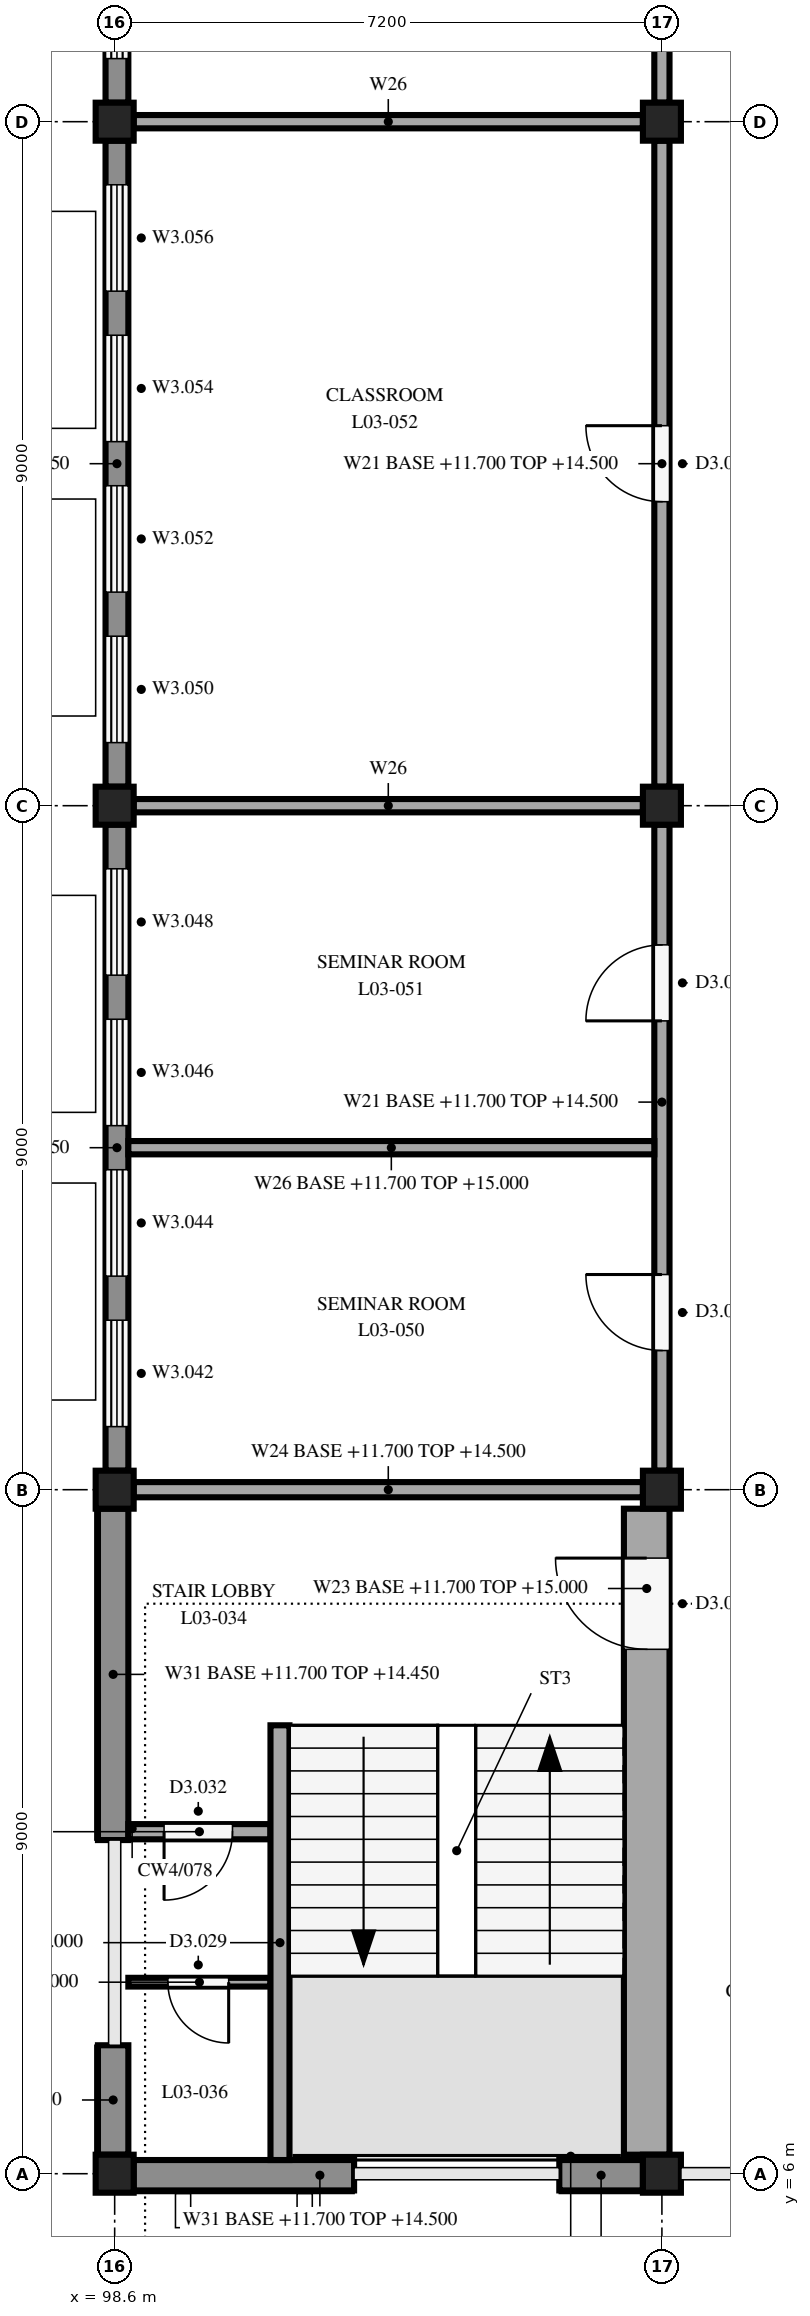
"""IFC4 building model, lengths in metres.
Left out: names, types, materials, properties, quantities, classifications, styles, units other than length and angle.
Written with IfcOpenShell. Run it as: python <this file> out.ifc"""

import sys

from ifc_helpers import new_model, si_unit, direction, frame, frame_2d, origin, origin_2d, place, context, subcontext, project, spatial, rectangle, extrude, element, fill, save


model = new_model("IFC4")
c1 = context("Model", 3, precision=1e-05, world=origin(), true_north=direction((0.0, 1.0)))
c2 = subcontext(c1, "Body", "Model", "MODEL_VIEW")
j1 = project(units=[si_unit("LENGTHUNIT", "METRE"), si_unit("PLANEANGLEUNIT", "RADIAN")], contexts=[c1])
p1 = place(None, origin())
s1 = spatial("IfcSite", under=j1, at=p1, CompositionType="ELEMENT")
p2 = place(p1, origin())
s2 = spatial("IfcBuilding", under=s1, at=p2, CompositionType="ELEMENT")
p3 = place(p2, frame((0.0, 0.0, 11.7)))
s3 = spatial("IfcBuildingStorey", under=s2, at=p3, CompositionType="ELEMENT", Elevation=11.7)
for number, where, z_axis, x_axis in (
    (1, (98.6, 6.0, 0.0), (0.0, 0.0, 1.0), (1.0, 0.0, 0.0)),
    (2, (98.6, 15.0, 0.0), (0.0, 0.0, 1.0), (1.0, 0.0, 0.0)),
    (3, (98.6, 24.0, 0.0), (0.0, 0.0, 1.0), (1.0, 0.0, 0.0)),
    (4, (98.6, 33.0, 0.0), (0.0, 0.0, 1.0), (1.0, 0.0, 0.0)),
    (5, (105.8, 6.0, 0.0), (0.0, 0.0, 1.0), (1.0, 0.0, 0.0)),
    (6, (105.8, 15.0, 0.0), (0.0, 0.0, 1.0), (1.0, 0.0, 0.0)),
    (7, (105.8, 24.0, 0.0), (0.0, 0.0, 1.0), (1.0, 0.0, 0.0)),
    (8, (105.8, 33.0, 0.0), (0.0, 0.0, 1.0), (1.0, 0.0, 0.0)),
):
    element("IfcColumn", number, at=place(p3, frame(where, z_axis=z_axis, x_axis=x_axis)), inside=s3, PredefinedType="COLUMN", context=c2, shape_type="SweptSolid", body=[
        extrude(rectangle(XDim=0.5, YDim=0.5, at=origin_2d()), origin(), (0.0, 0.0, 1.0), 3.3),
    ])
p4 = place(p3, frame((98.58, 6.25, 0.0), z_axis=(0.0, 0.0, 1.0), x_axis=(0.0, 1.0, 0.0)))
e9 = element("IfcWall", 9, at=p4, inside=s3, PredefinedType="STANDARD", context=c2, shape_type="SweptSolid", body=[
    extrude(rectangle(XDim=1.44, YDim=0.4, at=frame_2d((0.72, 0.0))), origin(), (0.0, 0.0, 1.0), 2.75),
])
p5 = place(p3, frame((98.58, 10.39, 0.0), z_axis=(0.0, 0.0, 1.0), x_axis=(0.0, 1.0, 0.0)))
e10 = element("IfcWall", 10, at=p5, inside=s3, PredefinedType="STANDARD", context=c2, shape_type="SweptSolid", body=[
    extrude(rectangle(XDim=4.36, YDim=0.4, at=frame_2d((2.18, 0.0))), origin(), (0.0, 0.0, 1.0), 2.75),
])
p6 = place(p3, frame((98.63, 15.25, 0.0), z_axis=(0.0, 0.0, 1.0), x_axis=(0.0, 1.0, 0.0)))
e11 = element("IfcWall", 11, at=p6, inside=s3, PredefinedType="STANDARD", context=c2, shape_type="SweptSolid", body=[
    extrude(rectangle(XDim=8.5, YDim=0.3, at=frame_2d((4.25, 0.0))), origin(), (0.0, 0.0, 1.0), 2.75),
])
p7 = place(p6, frame((0.58, 0.0, 0.6)))
e12 = element("IfcOpeningElement", 12, at=p7, cuts=e11, PredefinedType="OPENING", context=c2, shape_type="SweptSolid", body=[
    extrude(rectangle(XDim=1.4, YDim=2.1, at=frame_2d((0.7, 1.05))), frame((0.0, 0.16, 0.0), z_axis=(0.0, -1.0, 0.0), x_axis=(1.0, 0.0, 0.0)), (0.0, 0.0, 1.0), 0.32),
])
p8 = place(p6, frame((2.56, 0.0, 0.6)))
e13 = element("IfcOpeningElement", 13, at=p8, cuts=e11, PredefinedType="OPENING", context=c2, shape_type="SweptSolid", body=[
    extrude(rectangle(XDim=1.4, YDim=2.1, at=frame_2d((0.7, 1.05))), frame((0.0, 0.16, 0.0), z_axis=(0.0, -1.0, 0.0), x_axis=(1.0, 0.0, 0.0)), (0.0, 0.0, 1.0), 0.32),
])
p9 = place(p6, frame((4.54, 0.0, 0.6)))
e14 = element("IfcOpeningElement", 14, at=p9, cuts=e11, PredefinedType="OPENING", context=c2, shape_type="SweptSolid", body=[
    extrude(rectangle(XDim=1.4, YDim=2.1, at=frame_2d((0.7, 1.05))), frame((0.0, 0.16, 0.0), z_axis=(0.0, -1.0, 0.0), x_axis=(1.0, 0.0, 0.0)), (0.0, 0.0, 1.0), 0.32),
])
p10 = place(p6, frame((6.52, 0.0, 0.6)))
e15 = element("IfcOpeningElement", 15, at=p10, cuts=e11, PredefinedType="OPENING", context=c2, shape_type="SweptSolid", body=[
    extrude(rectangle(XDim=1.4, YDim=2.1, at=frame_2d((0.7, 1.05))), frame((0.0, 0.16, 0.0), z_axis=(0.0, -1.0, 0.0), x_axis=(1.0, 0.0, 0.0)), (0.0, 0.0, 1.0), 0.32),
])
p11 = place(p3, frame((98.63, 24.25, 0.0), z_axis=(0.0, 0.0, 1.0), x_axis=(0.0, 1.0, 0.0)))
e16 = element("IfcWall", 16, at=p11, inside=s3, PredefinedType="STANDARD", context=c2, shape_type="SweptSolid", body=[
    extrude(rectangle(XDim=8.5, YDim=0.3, at=frame_2d((4.25, 0.0))), origin(), (0.0, 0.0, 1.0), 2.75),
])
p12 = place(p11, frame((0.58, 0.0, 0.6)))
e17 = element("IfcOpeningElement", 17, at=p12, cuts=e16, PredefinedType="OPENING", context=c2, shape_type="SweptSolid", body=[
    extrude(rectangle(XDim=1.4, YDim=2.1, at=frame_2d((0.7, 1.05))), frame((0.0, 0.16, 0.0), z_axis=(0.0, -1.0, 0.0), x_axis=(1.0, 0.0, 0.0)), (0.0, 0.0, 1.0), 0.32),
])
p13 = place(p11, frame((2.56, 0.0, 0.6)))
e18 = element("IfcOpeningElement", 18, at=p13, cuts=e16, PredefinedType="OPENING", context=c2, shape_type="SweptSolid", body=[
    extrude(rectangle(XDim=1.4, YDim=2.1, at=frame_2d((0.7, 1.05))), frame((0.0, 0.16, 0.0), z_axis=(0.0, -1.0, 0.0), x_axis=(1.0, 0.0, 0.0)), (0.0, 0.0, 1.0), 0.32),
])
p14 = place(p11, frame((4.54, 0.0, 0.6)))
e19 = element("IfcOpeningElement", 19, at=p14, cuts=e16, PredefinedType="OPENING", context=c2, shape_type="SweptSolid", body=[
    extrude(rectangle(XDim=1.4, YDim=2.1, at=frame_2d((0.7, 1.05))), frame((0.0, 0.16, 0.0), z_axis=(0.0, -1.0, 0.0), x_axis=(1.0, 0.0, 0.0)), (0.0, 0.0, 1.0), 0.32),
])
p15 = place(p11, frame((6.52, 0.0, 0.6)))
e20 = element("IfcOpeningElement", 20, at=p15, cuts=e16, PredefinedType="OPENING", context=c2, shape_type="SweptSolid", body=[
    extrude(rectangle(XDim=1.4, YDim=2.1, at=frame_2d((0.7, 1.05))), frame((0.0, 0.16, 0.0), z_axis=(0.0, -1.0, 0.0), x_axis=(1.0, 0.0, 0.0)), (0.0, 0.0, 1.0), 0.32),
])
p16 = place(p3, frame((98.63, 33.25, 0.0), z_axis=(0.0, 0.0, 1.0), x_axis=(0.0, 1.0, 0.0)))
e21 = element("IfcWall", 21, at=p16, inside=s3, PredefinedType="STANDARD", context=c2, shape_type="SweptSolid", body=[
    extrude(rectangle(XDim=8.5, YDim=0.3, at=frame_2d((4.25, 0.0))), origin(), (0.0, 0.0, 1.0), 2.75),
])
p17 = place(p16, frame((0.58, 0.0, 0.6)))
e22 = element("IfcOpeningElement", 22, at=p17, cuts=e21, PredefinedType="OPENING", context=c2, shape_type="SweptSolid", body=[
    extrude(rectangle(XDim=1.4, YDim=2.1, at=frame_2d((0.7, 1.05))), frame((0.0, 0.16, 0.0), z_axis=(0.0, -1.0, 0.0), x_axis=(1.0, 0.0, 0.0)), (0.0, 0.0, 1.0), 0.32),
])
p18 = place(p16, frame((2.56, 0.0, 0.6)))
e23 = element("IfcOpeningElement", 23, at=p18, cuts=e21, PredefinedType="OPENING", context=c2, shape_type="SweptSolid", body=[
    extrude(rectangle(XDim=1.4, YDim=2.1, at=frame_2d((0.7, 1.05))), frame((0.0, 0.16, 0.0), z_axis=(0.0, -1.0, 0.0), x_axis=(1.0, 0.0, 0.0)), (0.0, 0.0, 1.0), 0.32),
])
p19 = place(p16, frame((4.54, 0.0, 0.6)))
e24 = element("IfcOpeningElement", 24, at=p19, cuts=e21, PredefinedType="OPENING", context=c2, shape_type="SweptSolid", body=[
    extrude(rectangle(XDim=1.4, YDim=2.1, at=frame_2d((0.7, 1.05))), frame((0.0, 0.16, 0.0), z_axis=(0.0, -1.0, 0.0), x_axis=(1.0, 0.0, 0.0)), (0.0, 0.0, 1.0), 0.32),
])
p20 = place(p16, frame((6.52, 0.0, 0.6)))
e25 = element("IfcOpeningElement", 25, at=p20, cuts=e21, PredefinedType="OPENING", context=c2, shape_type="SweptSolid", body=[
    extrude(rectangle(XDim=1.4, YDim=2.1, at=frame_2d((0.7, 1.05))), frame((0.0, 0.16, 0.0), z_axis=(0.0, -1.0, 0.0), x_axis=(1.0, 0.0, 0.0)), (0.0, 0.0, 1.0), 0.32),
])
p21 = place(p3, frame((101.75, 5.98, 0.0), z_axis=(0.0, 0.0, 1.0), x_axis=(-1.0, 0.0, 0.0)))
e26 = element("IfcWall", 26, at=p21, inside=s3, PredefinedType="STANDARD", context=c2, shape_type="SweptSolid", body=[
    extrude(rectangle(XDim=2.9, YDim=0.4, at=frame_2d((1.45, 0.0))), origin(), (0.0, 0.0, 1.0), 2.8),
])
p22 = place(p3, frame((105.55, 5.98, 0.0), z_axis=(0.0, 0.0, 1.0), x_axis=(-1.0, 0.0, 0.0)))
e27 = element("IfcWall", 27, at=p22, inside=s3, PredefinedType="STANDARD", context=c2, shape_type="SweptSolid", body=[
    extrude(rectangle(XDim=1.1, YDim=0.4, at=frame_2d((0.55, 0.0))), origin(), (0.0, 0.0, 1.0), 2.8),
])
p23 = place(p3, frame((100.775, 6.18, 0.0), z_axis=(0.0, 0.0, 1.0), x_axis=(0.0, 1.0, 0.0)))
e28 = element("IfcWall", 28, at=p23, inside=s3, PredefinedType="SOLIDWALL", context=c2, shape_type="SweptSolid", body=[
    extrude(rectangle(XDim=5.72, YDim=0.25, at=frame_2d((2.86, 0.0))), origin(), (0.0, 0.0, 1.0), 3.3),
])
p24 = place(p3, frame((105.6, 6.25, 0.0), z_axis=(0.0, 0.0, 1.0), x_axis=(0.0, 1.0, 0.0)))
e29 = element("IfcWall", 29, at=p24, inside=s3, PredefinedType="SOLIDWALL", context=c2, shape_type="SweptSolid", body=[
    extrude(rectangle(XDim=8.5, YDim=0.6, at=frame_2d((4.25, 0.0))), origin(), (0.0, 0.0, 1.0), 3.3),
])
p25 = place(p24, frame((6.65, 0.0, 0.0)))
e30 = element("IfcOpeningElement", 30, at=p25, cuts=e29, PredefinedType="OPENING", context=c2, shape_type="SweptSolid", body=[
    extrude(rectangle(XDim=1.2, YDim=2.1, at=frame_2d((0.6, 1.05))), frame((0.0, 0.31, 0.0), z_axis=(0.0, -1.0, 0.0), x_axis=(1.0, 0.0, 0.0)), (0.0, 0.0, 1.0), 0.62),
])
p26 = place(p3, frame((100.65, 10.5, 0.0), z_axis=(0.0, 0.0, 1.0), x_axis=(-1.0, 0.0, 0.0)))
e31 = element("IfcWall", 31, at=p26, inside=s3, PredefinedType="SOLIDWALL", context=c2, shape_type="SweptSolid", body=[
    extrude(rectangle(XDim=1.87, YDim=0.2, at=frame_2d((0.935, 0.0))), origin(), (0.0, 0.0, 1.0), 3.3),
])
p27 = place(p26, frame((0.5, 0.0, 0.0)))
e32 = element("IfcOpeningElement", 32, at=p27, cuts=e31, PredefinedType="OPENING", context=c2, shape_type="SweptSolid", body=[
    extrude(rectangle(XDim=0.9, YDim=2.1, at=frame_2d((0.45, 1.05))), frame((0.0, 0.11, 0.0), z_axis=(0.0, -1.0, 0.0), x_axis=(1.0, 0.0, 0.0)), (0.0, 0.0, 1.0), 0.22),
])
p28 = place(p3, frame((100.65, 8.52, 0.0), z_axis=(0.0, 0.0, 1.0), x_axis=(-1.0, 0.0, 0.0)))
e33 = element("IfcWall", 33, at=p28, inside=s3, PredefinedType="PARTITIONING", context=c2, shape_type="SweptSolid", body=[
    extrude(rectangle(XDim=1.87, YDim=0.115, at=frame_2d((0.935, 0.0))), origin(), (0.0, 0.0, 1.0), 3.3),
])
p29 = place(p28, frame((0.55, 0.0, 0.0)))
e34 = element("IfcOpeningElement", 34, at=p29, cuts=e33, PredefinedType="OPENING", context=c2, shape_type="SweptSolid", body=[
    extrude(rectangle(XDim=0.8, YDim=2.1, at=frame_2d((0.4, 1.05))), frame((0.0, 0.067, 0.0), z_axis=(0.0, -1.0, 0.0), x_axis=(1.0, 0.0, 0.0)), (0.0, 0.0, 1.0), 0.135),
])
p30 = place(p3, frame((98.85, 15.0, 0.0), z_axis=(0.0, 0.0, 1.0), x_axis=(1.0, 0.0, 0.0)))
e35 = element("IfcWall", 35, at=p30, inside=s3, PredefinedType="SOLIDWALL", context=c2, shape_type="SweptSolid", body=[
    extrude(rectangle(XDim=6.7, YDim=0.2, at=frame_2d((3.35, 0.0))), origin(), (0.0, 0.0, 1.0), 2.8),
])
p31 = place(p3, frame((105.8, 15.25, 0.0), z_axis=(0.0, 0.0, 1.0), x_axis=(0.0, 1.0, 0.0)))
e36 = element("IfcWall", 36, at=p31, inside=s3, PredefinedType="PARTITIONING", context=c2, shape_type="SweptSolid", body=[
    extrude(rectangle(XDim=8.5, YDim=0.2, at=frame_2d((4.25, 0.0))), origin(), (0.0, 0.0, 1.0), 2.8),
])
p32 = place(p31, frame((1.581, 0.0, 0.0)))
e37 = element("IfcOpeningElement", 37, at=p32, cuts=e36, PredefinedType="OPENING", context=c2, shape_type="SweptSolid", body=[
    extrude(rectangle(XDim=1.0, YDim=2.1, at=frame_2d((0.5, 1.05))), frame((0.0, 0.11, 0.0), z_axis=(0.0, -1.0, 0.0), x_axis=(1.0, 0.0, 0.0)), (0.0, 0.0, 1.0), 0.22),
])
p33 = place(p31, frame((5.919, 0.0, 0.0)))
e38 = element("IfcOpeningElement", 38, at=p33, cuts=e36, PredefinedType="OPENING", context=c2, shape_type="SweptSolid", body=[
    extrude(rectangle(XDim=1.0, YDim=2.1, at=frame_2d((0.5, 1.05))), frame((0.0, 0.11, 0.0), z_axis=(0.0, -1.0, 0.0), x_axis=(1.0, 0.0, 0.0)), (0.0, 0.0, 1.0), 0.22),
])
p34 = place(p3, frame((105.8, 24.25, 0.0), z_axis=(0.0, 0.0, 1.0), x_axis=(0.0, 1.0, 0.0)))
e39 = element("IfcWall", 39, at=p34, inside=s3, PredefinedType="PARTITIONING", context=c2, shape_type="SweptSolid", body=[
    extrude(rectangle(XDim=8.5, YDim=0.2, at=frame_2d((4.25, 0.0))), origin(), (0.0, 0.0, 1.0), 2.8),
])
p35 = place(p34, frame((3.75, 0.0, 0.0)))
e40 = element("IfcOpeningElement", 40, at=p35, cuts=e39, PredefinedType="OPENING", context=c2, shape_type="SweptSolid", body=[
    extrude(rectangle(XDim=1.0, YDim=2.1, at=frame_2d((0.5, 1.05))), frame((0.0, 0.11, 0.0), z_axis=(0.0, -1.0, 0.0), x_axis=(1.0, 0.0, 0.0)), (0.0, 0.0, 1.0), 0.22),
])
p36 = place(p3, frame((105.8, 33.25, 0.0), z_axis=(0.0, 0.0, 1.0), x_axis=(0.0, 1.0, 0.0)))
e41 = element("IfcWall", 41, at=p36, inside=s3, PredefinedType="PARTITIONING", context=c2, shape_type="SweptSolid", body=[
    extrude(rectangle(XDim=8.5, YDim=0.2, at=frame_2d((4.25, 0.0))), origin(), (0.0, 0.0, 1.0), 2.8),
])
p37 = place(p36, frame((3.75, 0.0, 0.0)))
e42 = element("IfcOpeningElement", 42, at=p37, cuts=e41, PredefinedType="OPENING", context=c2, shape_type="SweptSolid", body=[
    extrude(rectangle(XDim=1.0, YDim=2.1, at=frame_2d((0.5, 1.05))), frame((0.0, 0.11, 0.0), z_axis=(0.0, -1.0, 0.0), x_axis=(1.0, 0.0, 0.0)), (0.0, 0.0, 1.0), 0.22),
])
p38 = place(p3, frame((98.78, 19.5, 0.0), z_axis=(0.0, 0.0, 1.0), x_axis=(1.0, 0.0, 0.0)))
e43 = element("IfcWall", 43, at=p38, inside=s3, PredefinedType="PARTITIONING", context=c2, shape_type="SweptSolid", body=[
    extrude(rectangle(XDim=6.92, YDim=0.175, at=frame_2d((3.46, 0.0))), origin(), (0.0, 0.0, 1.0), 3.3),
])
for number, where, z_axis, x_axis in (
    (44, (98.85, 24.0, 0.0), (0.0, 0.0, 1.0), (1.0, 0.0, 0.0)),
    (45, (98.85, 33.0, 0.0), (0.0, 0.0, 1.0), (1.0, 0.0, 0.0)),
):
    element("IfcWall", number, at=place(p3, frame(where, z_axis=z_axis, x_axis=x_axis)), inside=s3, PredefinedType="PARTITIONING", context=c2, shape_type="SweptSolid", body=[
        extrude(rectangle(XDim=6.7, YDim=0.175, at=frame_2d((3.35, 0.0))), origin(), (0.0, 0.0, 1.0), 2.8),
    ])
p39 = place(p7, origin())
e46 = element("IfcWindow", 46, at=p39, inside=s3, PartitioningType="DOUBLE_PANEL_VERTICAL", PredefinedType="WINDOW", context=c2, shape_type="SweptSolid", body=[
    extrude(rectangle(XDim=1.4, YDim=2.1, at=frame_2d((0.7, 1.05))), frame((0.0, 0.03, 0.0), z_axis=(0.0, -1.0, 0.0), x_axis=(1.0, 0.0, 0.0)), (0.0, 0.0, 1.0), 0.06),
])
fill(e12, e46)
p40 = place(p8, origin())
e47 = element("IfcWindow", 47, at=p40, inside=s3, PartitioningType="DOUBLE_PANEL_VERTICAL", PredefinedType="WINDOW", context=c2, shape_type="SweptSolid", body=[
    extrude(rectangle(XDim=1.4, YDim=2.1, at=frame_2d((0.7, 1.05))), frame((0.0, 0.03, 0.0), z_axis=(0.0, -1.0, 0.0), x_axis=(1.0, 0.0, 0.0)), (0.0, 0.0, 1.0), 0.06),
])
fill(e13, e47)
p41 = place(p9, origin())
e48 = element("IfcWindow", 48, at=p41, inside=s3, PartitioningType="DOUBLE_PANEL_VERTICAL", PredefinedType="WINDOW", context=c2, shape_type="SweptSolid", body=[
    extrude(rectangle(XDim=1.4, YDim=2.1, at=frame_2d((0.7, 1.05))), frame((0.0, 0.03, 0.0), z_axis=(0.0, -1.0, 0.0), x_axis=(1.0, 0.0, 0.0)), (0.0, 0.0, 1.0), 0.06),
])
fill(e14, e48)
p42 = place(p10, origin())
e49 = element("IfcWindow", 49, at=p42, inside=s3, PartitioningType="DOUBLE_PANEL_VERTICAL", PredefinedType="WINDOW", context=c2, shape_type="SweptSolid", body=[
    extrude(rectangle(XDim=1.4, YDim=2.1, at=frame_2d((0.7, 1.05))), frame((0.0, 0.03, 0.0), z_axis=(0.0, -1.0, 0.0), x_axis=(1.0, 0.0, 0.0)), (0.0, 0.0, 1.0), 0.06),
])
fill(e15, e49)
p43 = place(p12, origin())
e50 = element("IfcWindow", 50, at=p43, inside=s3, PartitioningType="DOUBLE_PANEL_VERTICAL", PredefinedType="WINDOW", context=c2, shape_type="SweptSolid", body=[
    extrude(rectangle(XDim=1.4, YDim=2.1, at=frame_2d((0.7, 1.05))), frame((0.0, 0.03, 0.0), z_axis=(0.0, -1.0, 0.0), x_axis=(1.0, 0.0, 0.0)), (0.0, 0.0, 1.0), 0.06),
])
fill(e17, e50)
p44 = place(p13, origin())
e51 = element("IfcWindow", 51, at=p44, inside=s3, PartitioningType="DOUBLE_PANEL_VERTICAL", PredefinedType="WINDOW", context=c2, shape_type="SweptSolid", body=[
    extrude(rectangle(XDim=1.4, YDim=2.1, at=frame_2d((0.7, 1.05))), frame((0.0, 0.03, 0.0), z_axis=(0.0, -1.0, 0.0), x_axis=(1.0, 0.0, 0.0)), (0.0, 0.0, 1.0), 0.06),
])
fill(e18, e51)
p45 = place(p14, origin())
e52 = element("IfcWindow", 52, at=p45, inside=s3, PartitioningType="DOUBLE_PANEL_VERTICAL", PredefinedType="WINDOW", context=c2, shape_type="SweptSolid", body=[
    extrude(rectangle(XDim=1.4, YDim=2.1, at=frame_2d((0.7, 1.05))), frame((0.0, 0.03, 0.0), z_axis=(0.0, -1.0, 0.0), x_axis=(1.0, 0.0, 0.0)), (0.0, 0.0, 1.0), 0.06),
])
fill(e19, e52)
p46 = place(p15, origin())
e53 = element("IfcWindow", 53, at=p46, inside=s3, PartitioningType="DOUBLE_PANEL_VERTICAL", PredefinedType="WINDOW", context=c2, shape_type="SweptSolid", body=[
    extrude(rectangle(XDim=1.4, YDim=2.1, at=frame_2d((0.7, 1.05))), frame((0.0, 0.03, 0.0), z_axis=(0.0, -1.0, 0.0), x_axis=(1.0, 0.0, 0.0)), (0.0, 0.0, 1.0), 0.06),
])
fill(e20, e53)
p47 = place(p17, origin())
e54 = element("IfcWindow", 54, at=p47, inside=s3, PartitioningType="DOUBLE_PANEL_VERTICAL", PredefinedType="WINDOW", context=c2, shape_type="SweptSolid", body=[
    extrude(rectangle(XDim=1.4, YDim=2.1, at=frame_2d((0.7, 1.05))), frame((0.0, 0.03, 0.0), z_axis=(0.0, -1.0, 0.0), x_axis=(1.0, 0.0, 0.0)), (0.0, 0.0, 1.0), 0.06),
])
fill(e22, e54)
p48 = place(p25, origin())
e55 = element("IfcDoor", 55, at=p48, inside=s3, OperationType="SINGLE_SWING_RIGHT", PredefinedType="DOOR", context=c2, shape_type="SweptSolid", body=[
    extrude(rectangle(XDim=1.2, YDim=2.1, at=frame_2d((0.6, 1.05))), frame((0.0, 0.025, 0.0), z_axis=(0.0, -1.0, 0.0), x_axis=(1.0, 0.0, 0.0)), (0.0, 0.0, 1.0), 0.05),
])
fill(e30, e55)
p49 = place(p27, origin())
e56 = element("IfcDoor", 56, at=p49, inside=s3, OperationType="SINGLE_SWING_RIGHT", PredefinedType="DOOR", context=c2, shape_type="SweptSolid", body=[
    extrude(rectangle(XDim=0.9, YDim=2.1, at=frame_2d((0.45, 1.05))), frame((0.0, 0.025, 0.0), z_axis=(0.0, -1.0, 0.0), x_axis=(1.0, 0.0, 0.0)), (0.0, 0.0, 1.0), 0.05),
])
fill(e32, e56)
p50 = place(p29, origin())
e57 = element("IfcDoor", 57, at=p50, inside=s3, OperationType="SINGLE_SWING_LEFT", PredefinedType="DOOR", context=c2, shape_type="SweptSolid", body=[
    extrude(rectangle(XDim=0.8, YDim=2.1, at=frame_2d((0.4, 1.05))), frame((0.0, 0.025, 0.0), z_axis=(0.0, -1.0, 0.0), x_axis=(1.0, 0.0, 0.0)), (0.0, 0.0, 1.0), 0.05),
])
fill(e34, e57)
p51 = place(p32, origin())
e58 = element("IfcDoor", 58, at=p51, inside=s3, OperationType="SINGLE_SWING_RIGHT", PredefinedType="DOOR", context=c2, shape_type="SweptSolid", body=[
    extrude(rectangle(XDim=1.0, YDim=2.1, at=frame_2d((0.5, 1.05))), frame((0.0, 0.025, 0.0), z_axis=(0.0, -1.0, 0.0), x_axis=(1.0, 0.0, 0.0)), (0.0, 0.0, 1.0), 0.05),
])
fill(e37, e58)
p52 = place(p33, origin())
e59 = element("IfcDoor", 59, at=p52, inside=s3, OperationType="SINGLE_SWING_LEFT", PredefinedType="DOOR", context=c2, shape_type="SweptSolid", body=[
    extrude(rectangle(XDim=1.0, YDim=2.1, at=frame_2d((0.5, 1.05))), frame((0.0, 0.025, 0.0), z_axis=(0.0, -1.0, 0.0), x_axis=(1.0, 0.0, 0.0)), (0.0, 0.0, 1.0), 0.05),
])
fill(e38, e59)
p53 = place(p35, origin())
e60 = element("IfcDoor", 60, at=p53, inside=s3, OperationType="SINGLE_SWING_RIGHT", PredefinedType="DOOR", context=c2, shape_type="SweptSolid", body=[
    extrude(rectangle(XDim=1.0, YDim=2.1, at=frame_2d((0.5, 1.05))), frame((0.0, 0.025, 0.0), z_axis=(0.0, -1.0, 0.0), x_axis=(1.0, 0.0, 0.0)), (0.0, 0.0, 1.0), 0.05),
])
fill(e40, e60)
save(model, sys.argv[1])
